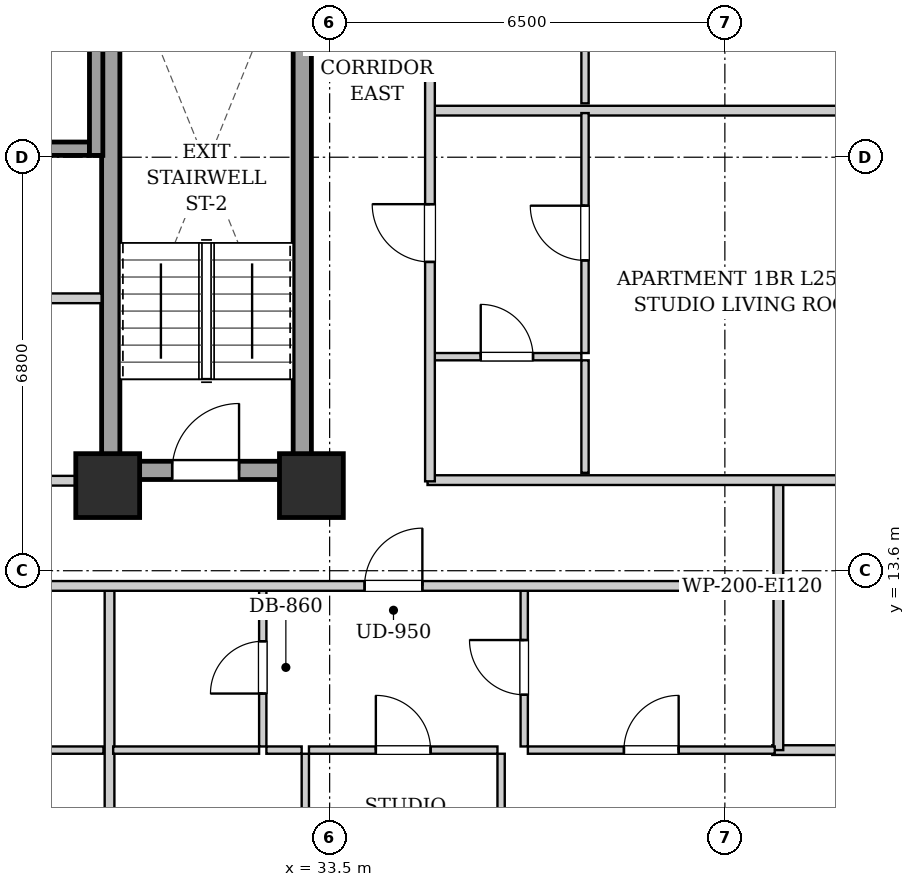
"""IFC4 building model, lengths in metres.
Left out: names, types, materials, properties, quantities, classifications, styles, units other than length and angle.
Written with IfcOpenShell. Run it as: python <this file> out.ifc"""

import sys

from ifc_helpers import new_model, si_unit, direction, frame, frame_2d, origin, origin_2d, place, context, subcontext, project, spatial, rectangle, extrude, element, fill, save


model = new_model("IFC4")
c1 = context("Model", 3, precision=1e-05, world=origin(), true_north=direction((0.0, 1.0)))
c2 = subcontext(c1, "Body", "Model", "MODEL_VIEW")
j1 = project(units=[si_unit("LENGTHUNIT", "METRE"), si_unit("PLANEANGLEUNIT", "RADIAN")], contexts=[c1])
p1 = place(None, origin())
s1 = spatial("IfcSite", under=j1, at=p1, CompositionType="ELEMENT")
p2 = place(p1, origin())
s2 = spatial("IfcBuilding", under=s1, at=p2, CompositionType="ELEMENT")
p3 = place(p2, frame((0.0, 0.0, 91.1)))
s3 = spatial("IfcBuildingStorey", under=s2, at=p3, CompositionType="ELEMENT", Elevation=91.1)
for number, where, z_axis, x_axis in (
    (1, (29.85, 15.0, 0.0), (0.0, 0.0, 1.0), (1.0, 0.0, 0.0)),
    (2, (33.2, 15.0, 0.0), (0.0, 0.0, 1.0), (1.0, 0.0, 0.0)),
):
    element("IfcColumn", number, at=place(p3, frame(where, z_axis=z_axis, x_axis=x_axis)), inside=s3, PredefinedType="COLUMN", context=c2, shape_type="SweptSolid", body=[
        extrude(rectangle(XDim=1.05, YDim=1.05, at=origin_2d()), origin(), (0.0, 0.0, 1.0), 3.2),
    ])
for number, where, z_axis, x_axis in (
    (3, (29.9, 15.1, 0.0), (0.0, 0.0, 1.0), (0.0, 1.0, 0.0)),
    (4, (33.05, 15.1, 0.0), (0.0, 0.0, 1.0), (0.0, 1.0, 0.0)),
):
    element("IfcWall", number, at=place(p3, frame(where, z_axis=z_axis, x_axis=x_axis)), inside=s3, PredefinedType="SHEAR", context=c2, shape_type="SweptSolid", body=[
        extrude(rectangle(XDim=9.0, YDim=0.3, at=frame_2d((4.5, 0.0))), origin(), (0.0, 0.0, 1.0), 2.94),
    ])
p4 = place(p3, frame((30.05, 15.25, 0.0), z_axis=(0.0, 0.0, 1.0), x_axis=(1.0, 0.0, 0.0)))
e5 = element("IfcWall", 5, at=p4, inside=s3, PredefinedType="SHEAR", context=c2, shape_type="SweptSolid", body=[
    extrude(rectangle(XDim=2.85, YDim=0.3, at=frame_2d((1.425, 0.0))), origin(), (0.0, 0.0, 1.0), 2.94),
])
p5 = place(p4, frame((0.86, 0.0, 0.0)))
e6 = element("IfcOpeningElement", 6, at=p5, cuts=e5, PredefinedType="OPENING", context=c2, shape_type="SweptSolid", body=[
    extrude(rectangle(XDim=1.1, YDim=2.05, at=frame_2d((0.55, 1.025))), frame((0.0, 0.16, 0.0), z_axis=(0.0, -1.0, 0.0), x_axis=(1.0, 0.0, 0.0)), (0.0, 0.0, 1.0), 0.32),
])
p6 = place(p3, frame((27.65, 20.54, 0.0), z_axis=(0.0, 0.0, 1.0), x_axis=(1.0, 0.0, 0.0)))
e7 = element("IfcWall", 7, at=p6, inside=s3, PredefinedType="SHEAR", context=c2, shape_type="SweptSolid", body=[
    extrude(rectangle(XDim=1.9, YDim=0.22, at=frame_2d((0.95, 0.0))), origin(), (0.0, 0.0, 1.0), 2.94),
])
p7 = place(p3, frame((29.66, 20.43, 0.0), z_axis=(0.0, 0.0, 1.0), x_axis=(0.0, 1.0, 0.0)))
e8 = element("IfcWall", 8, at=p7, inside=s3, PredefinedType="SHEAR", context=c2, shape_type="SweptSolid", body=[
    extrude(rectangle(XDim=2.44, YDim=0.22, at=frame_2d((1.22, 0.0))), origin(), (0.0, 0.0, 1.0), 2.94),
])
p8 = place(p3, frame((21.25, 15.08, 0.0), z_axis=(0.0, 0.0, 1.0), x_axis=(1.0, 0.0, 0.0)))
e9 = element("IfcWall", 9, at=p8, inside=s3, PredefinedType="PARTITIONING", context=c2, shape_type="SweptSolid", body=[
    extrude(rectangle(XDim=8.5, YDim=0.16, at=frame_2d((4.25, 0.0))), origin(), (0.0, 0.0, 1.0), 2.309),
])
p9 = place(p8, frame((3.725, 0.0, 0.0)))
e10 = element("IfcOpeningElement", 10, at=p9, cuts=e9, PredefinedType="OPENING", context=c2, shape_type="SweptSolid", body=[
    extrude(rectangle(XDim=1.05, YDim=2.05, at=frame_2d((0.525, 1.025))), frame((0.0, 0.09, 0.0), z_axis=(0.0, -1.0, 0.0), x_axis=(1.0, 0.0, 0.0)), (0.0, 0.0, 1.0), 0.18),
])
p10 = place(p3, frame((28.65, 18.08, 0.0), z_axis=(0.0, 0.0, 1.0), x_axis=(1.0, 0.0, 0.0)))
e11 = element("IfcWall", 11, at=p10, inside=s3, PredefinedType="PARTITIONING", context=c2, shape_type="SweptSolid", body=[
    extrude(rectangle(XDim=1.1, YDim=0.16, at=frame_2d((0.55, 0.0))), origin(), (0.0, 0.0, 1.0), 2.94),
])
p11 = place(p3, frame((40.88, 13.35, 0.0), z_axis=(0.0, 0.0, 1.0), x_axis=(0.0, 1.0, 0.0)))
e12 = element("IfcWall", 12, at=p11, inside=s3, PredefinedType="PARTITIONING", context=c2, shape_type="SweptSolid", body=[
    extrude(rectangle(XDim=1.74, YDim=0.16, at=frame_2d((0.87, 0.0))), origin(), (0.0, 0.0, 1.0), 2.94),
])
p12 = place(p3, frame((35.11, 15.09, 0.0), z_axis=(0.0, 0.0, 1.0), x_axis=(1.0, 0.0, 0.0)))
e13 = element("IfcWall", 13, at=p12, inside=s3, PredefinedType="PARTITIONING", context=c2, shape_type="SweptSolid", body=[
    extrude(rectangle(XDim=8.01, YDim=0.16, at=frame_2d((4.005, 0.0))), origin(), (0.0, 0.0, 1.0), 2.309),
])
p13 = place(p3, frame((25.382, 10.65, 0.0), z_axis=(0.0, 0.0, 1.0), x_axis=(1.0, 0.0, 0.0)))
e14 = element("IfcWall", 14, at=p13, inside=s3, PredefinedType="PARTITIONING", context=c2, shape_type="SweptSolid", body=[
    extrude(rectangle(XDim=4.398, YDim=0.12, at=frame_2d((2.199, 0.0))), origin(), (0.0, 0.0, 1.0), 2.94),
])
p14 = place(p13, frame((1.749, 0.0, 0.0)))
e15 = element("IfcOpeningElement", 15, at=p14, cuts=e14, PredefinedType="OPENING", context=c2, shape_type="SweptSolid", body=[
    extrude(rectangle(XDim=0.9, YDim=2.05, at=frame_2d((0.45, 1.025))), frame((0.0, 0.07, 0.0), z_axis=(0.0, -1.0, 0.0), x_axis=(1.0, 0.0, 0.0)), (0.0, 0.0, 1.0), 0.14),
])
p15 = place(p3, frame((40.78, 10.65, 0.0), z_axis=(0.0, 0.0, 1.0), x_axis=(1.0, 0.0, 0.0)))
e16 = element("IfcWall", 16, at=p15, inside=s3, PredefinedType="PARTITIONING", context=c2, shape_type="SweptSolid", body=[
    extrude(rectangle(XDim=2.34, YDim=0.16, at=frame_2d((1.17, 0.0))), origin(), (0.0, 0.0, 1.0), 2.94),
])
p16 = place(p3, frame((40.88, 10.65, 0.0), z_axis=(0.0, 0.0, 1.0), x_axis=(0.0, 1.0, 0.0)))
e17 = element("IfcWall", 17, at=p16, inside=s3, PredefinedType="PARTITIONING", context=c2, shape_type="SweptSolid", body=[
    extrude(rectangle(XDim=2.66, YDim=0.16, at=frame_2d((1.33, 0.0))), origin(), (0.0, 0.0, 1.0), 2.94),
])
p17 = place(p3, frame((29.88, 0.28, 0.0), z_axis=(0.0, 0.0, 1.0), x_axis=(0.0, 1.0, 0.0)))
e18 = element("IfcWall", 18, at=p17, inside=s3, PredefinedType="PARTITIONING", context=c2, shape_type="SweptSolid", body=[
    extrude(rectangle(XDim=13.03, YDim=0.16, at=frame_2d((6.515, 0.0))), origin(), (0.0, 0.0, 1.0), 2.94),
])
p18 = place(p3, frame((32.4, 10.71, 0.0), z_axis=(0.0, 0.0, 1.0), x_axis=(0.0, 1.0, 0.0)))
e19 = element("IfcWall", 19, at=p18, inside=s3, PredefinedType="PARTITIONING", context=c2, shape_type="SweptSolid", body=[
    extrude(rectangle(XDim=2.6, YDim=0.12, at=frame_2d((1.3, 0.0))), origin(), (0.0, 0.0, 1.0), 2.94),
])
p19 = place(p18, frame((0.87, 0.0, 0.0)))
e20 = element("IfcOpeningElement", 20, at=p19, cuts=e19, PredefinedType="OPENING", context=c2, shape_type="SweptSolid", body=[
    extrude(rectangle(XDim=0.86, YDim=2.05, at=frame_2d((0.43, 1.025))), frame((0.0, 0.07, 0.0), z_axis=(0.0, -1.0, 0.0), x_axis=(1.0, 0.0, 0.0)), (0.0, 0.0, 1.0), 0.14),
])
p20 = place(p3, frame((29.94, 10.65, 0.0), z_axis=(0.0, 0.0, 1.0), x_axis=(1.0, 0.0, 0.0)))
e21 = element("IfcWall", 21, at=p20, inside=s3, PredefinedType="PARTITIONING", context=c2, shape_type="SweptSolid", body=[
    extrude(rectangle(XDim=2.4, YDim=0.12, at=frame_2d((1.2, 0.0))), origin(), (0.0, 0.0, 1.0), 2.94),
])
p21 = place(p3, frame((36.7, 10.71, 0.0), z_axis=(0.0, 0.0, 1.0), x_axis=(0.0, 1.0, 0.0)))
e22 = element("IfcWall", 22, at=p21, inside=s3, PredefinedType="PARTITIONING", context=c2, shape_type="SweptSolid", body=[
    extrude(rectangle(XDim=2.6, YDim=0.12, at=frame_2d((1.3, 0.0))), origin(), (0.0, 0.0, 1.0), 2.94),
])
p22 = place(p21, frame((0.85, 0.0, 0.0)))
e23 = element("IfcOpeningElement", 23, at=p22, cuts=e22, PredefinedType="OPENING", context=c2, shape_type="SweptSolid", body=[
    extrude(rectangle(XDim=0.9, YDim=2.05, at=frame_2d((0.45, 1.025))), frame((0.0, 0.07, 0.0), z_axis=(0.0, -1.0, 0.0), x_axis=(1.0, 0.0, 0.0)), (0.0, 0.0, 1.0), 0.14),
])
p23 = place(p3, frame((32.46, 10.65, 0.0), z_axis=(0.0, 0.0, 1.0), x_axis=(1.0, 0.0, 0.0)))
e24 = element("IfcWall", 24, at=p23, inside=s3, PredefinedType="PARTITIONING", context=c2, shape_type="SweptSolid", body=[
    extrude(rectangle(XDim=0.58, YDim=0.12, at=frame_2d((0.29, 0.0))), origin(), (0.0, 0.0, 1.0), 2.94),
])
p24 = place(p3, frame((33.16, 10.65, 0.0), z_axis=(0.0, 0.0, 1.0), x_axis=(1.0, 0.0, 0.0)))
e25 = element("IfcWall", 25, at=p24, inside=s3, PredefinedType="PARTITIONING", context=c2, shape_type="SweptSolid", body=[
    extrude(rectangle(XDim=3.1, YDim=0.12, at=frame_2d((1.55, 0.0))), origin(), (0.0, 0.0, 1.0), 2.94),
])
p25 = place(p24, frame((1.1, 0.0, 0.0)))
e26 = element("IfcOpeningElement", 26, at=p25, cuts=e25, PredefinedType="OPENING", context=c2, shape_type="SweptSolid", body=[
    extrude(rectangle(XDim=0.9, YDim=2.05, at=frame_2d((0.45, 1.025))), frame((0.0, 0.07, 0.0), z_axis=(0.0, -1.0, 0.0), x_axis=(1.0, 0.0, 0.0)), (0.0, 0.0, 1.0), 0.14),
])
p26 = place(p3, frame((36.76, 10.65, 0.0), z_axis=(0.0, 0.0, 1.0), x_axis=(1.0, 0.0, 0.0)))
e27 = element("IfcWall", 27, at=p26, inside=s3, PredefinedType="PARTITIONING", context=c2, shape_type="SweptSolid", body=[
    extrude(rectangle(XDim=4.06, YDim=0.12, at=frame_2d((2.03, 0.0))), origin(), (0.0, 0.0, 1.0), 2.94),
])
p27 = place(p26, frame((1.58, 0.0, 0.0)))
e28 = element("IfcOpeningElement", 28, at=p27, cuts=e27, PredefinedType="OPENING", context=c2, shape_type="SweptSolid", body=[
    extrude(rectangle(XDim=0.9, YDim=2.05, at=frame_2d((0.45, 1.025))), frame((0.0, 0.07, 0.0), z_axis=(0.0, -1.0, 0.0), x_axis=(1.0, 0.0, 0.0)), (0.0, 0.0, 1.0), 0.14),
])
p28 = place(p3, frame((33.1, 0.28, 0.0), z_axis=(0.0, 0.0, 1.0), x_axis=(0.0, 1.0, 0.0)))
e29 = element("IfcWall", 29, at=p28, inside=s3, PredefinedType="PARTITIONING", context=c2, shape_type="SweptSolid", body=[
    extrude(rectangle(XDim=10.31, YDim=0.12, at=frame_2d((5.155, 0.0))), origin(), (0.0, 0.0, 1.0), 2.309),
])
p29 = place(p28, frame((4.69, 0.0, 0.0)))
e30 = element("IfcOpeningElement", 30, at=p29, cuts=e29, PredefinedType="OPENING", context=c2, shape_type="SweptSolid", body=[
    extrude(rectangle(XDim=0.9, YDim=2.05, at=frame_2d((0.45, 1.025))), frame((0.0, 0.07, 0.0), z_axis=(0.0, -1.0, 0.0), x_axis=(1.0, 0.0, 0.0)), (0.0, 0.0, 1.0), 0.14),
])
p30 = place(p3, frame((36.32, 0.28, 0.0), z_axis=(0.0, 0.0, 1.0), x_axis=(0.0, 1.0, 0.0)))
e31 = element("IfcWall", 31, at=p30, inside=s3, PredefinedType="PARTITIONING", context=c2, shape_type="SweptSolid", body=[
    extrude(rectangle(XDim=10.31, YDim=0.12, at=frame_2d((5.155, 0.0))), origin(), (0.0, 0.0, 1.0), 2.94),
])
p31 = place(p30, frame((4.69, 0.0, 0.0)))
e32 = element("IfcOpeningElement", 32, at=p31, cuts=e31, PredefinedType="OPENING", context=c2, shape_type="SweptSolid", body=[
    extrude(rectangle(XDim=0.9, YDim=2.05, at=frame_2d((0.45, 1.025))), frame((0.0, 0.07, 0.0), z_axis=(0.0, -1.0, 0.0), x_axis=(1.0, 0.0, 0.0)), (0.0, 0.0, 1.0), 0.14),
])
p32 = place(p3, frame((35.19, 21.166, 0.0), z_axis=(0.0, 0.0, 1.0), x_axis=(1.0, 0.0, 0.0)))
e33 = element("IfcWall", 33, at=p32, inside=s3, PredefinedType="PARTITIONING", context=c2, shape_type="SweptSolid", body=[
    extrude(rectangle(XDim=7.93, YDim=0.16, at=frame_2d((3.965, 0.0))), origin(), (0.0, 0.0, 1.0), 2.94),
])
p33 = place(p3, frame((35.19, 17.12, 0.0), z_axis=(0.0, 0.0, 1.0), x_axis=(1.0, 0.0, 0.0)))
e34 = element("IfcWall", 34, at=p33, inside=s3, PredefinedType="PARTITIONING", context=c2, shape_type="SweptSolid", body=[
    extrude(rectangle(XDim=2.45, YDim=0.12, at=frame_2d((1.225, 0.0))), origin(), (0.0, 0.0, 1.0), 2.94),
])
p34 = place(p33, frame((0.795, 0.0, 0.0)))
e35 = element("IfcOpeningElement", 35, at=p34, cuts=e34, PredefinedType="OPENING", context=c2, shape_type="SweptSolid", body=[
    extrude(rectangle(XDim=0.86, YDim=2.05, at=frame_2d((0.43, 1.025))), frame((0.0, 0.07, 0.0), z_axis=(0.0, -1.0, 0.0), x_axis=(1.0, 0.0, 0.0)), (0.0, 0.0, 1.0), 0.14),
])
p35 = place(p3, frame((37.7, 15.21, 0.0), z_axis=(0.0, 0.0, 1.0), x_axis=(0.0, 1.0, 0.0)))
e36 = element("IfcWall", 36, at=p35, inside=s3, PredefinedType="PARTITIONING", context=c2, shape_type="SweptSolid", body=[
    extrude(rectangle(XDim=1.85, YDim=0.12, at=frame_2d((0.925, 0.0))), origin(), (0.0, 0.0, 1.0), 2.94),
])
p36 = place(p3, frame((37.7, 17.18, 0.0), z_axis=(0.0, 0.0, 1.0), x_axis=(0.0, 1.0, 0.0)))
e37 = element("IfcWall", 37, at=p36, inside=s3, PredefinedType="PARTITIONING", context=c2, shape_type="SweptSolid", body=[
    extrude(rectangle(XDim=3.946, YDim=0.12, at=frame_2d((1.973, 0.0))), origin(), (0.0, 0.0, 1.0), 2.94),
])
p37 = place(p36, frame((1.523, 0.0, 0.0)))
e38 = element("IfcOpeningElement", 38, at=p37, cuts=e37, PredefinedType="OPENING", context=c2, shape_type="SweptSolid", body=[
    extrude(rectangle(XDim=0.9, YDim=2.05, at=frame_2d((0.45, 1.025))), frame((0.0, 0.07, 0.0), z_axis=(0.0, -1.0, 0.0), x_axis=(1.0, 0.0, 0.0)), (0.0, 0.0, 1.0), 0.14),
])
p38 = place(p3, frame((37.7, 21.286, 0.0), z_axis=(0.0, 0.0, 1.0), x_axis=(0.0, 1.0, 0.0)))
e39 = element("IfcWall", 39, at=p38, inside=s3, PredefinedType="PARTITIONING", context=c2, shape_type="SweptSolid", body=[
    extrude(rectangle(XDim=2.121, YDim=0.12, at=frame_2d((1.061, 0.0))), origin(), (0.0, 0.0, 1.0), 2.94),
])
p39 = place(p3, frame((10.05, 13.35, 0.0), z_axis=(0.0, 0.0, 1.0), x_axis=(1.0, 0.0, 0.0)))
e40 = element("IfcWall", 40, at=p39, inside=s3, PredefinedType="PARTITIONING", context=c2, shape_type="SweptSolid", body=[
    extrude(rectangle(XDim=30.8, YDim=0.16, at=frame_2d((15.4, 0.0))), origin(), (0.0, 0.0, 1.0), 2.94),
])
p40 = place(p39, frame((0.62, 0.0, 0.0)))
e41 = element("IfcOpeningElement", 41, at=p40, cuts=e40, PredefinedType="OPENING", context=c2, shape_type="SweptSolid", body=[
    extrude(rectangle(XDim=0.95, YDim=2.1, at=frame_2d((0.475, 1.05))), frame((0.0, 0.09, 0.0), z_axis=(0.0, -1.0, 0.0), x_axis=(1.0, 0.0, 0.0)), (0.0, 0.0, 1.0), 0.18),
])
p41 = place(p39, frame((6.115, 0.0, 0.0)))
e42 = element("IfcOpeningElement", 42, at=p41, cuts=e40, PredefinedType="OPENING", context=c2, shape_type="SweptSolid", body=[
    extrude(rectangle(XDim=0.95, YDim=2.1, at=frame_2d((0.475, 1.05))), frame((0.0, 0.09, 0.0), z_axis=(0.0, -1.0, 0.0), x_axis=(1.0, 0.0, 0.0)), (0.0, 0.0, 1.0), 0.18),
])
p42 = place(p39, frame((17.056, 0.0, 0.0)))
e43 = element("IfcOpeningElement", 43, at=p42, cuts=e40, PredefinedType="OPENING", context=c2, shape_type="SweptSolid", body=[
    extrude(rectangle(XDim=0.95, YDim=2.1, at=frame_2d((0.475, 1.05))), frame((0.0, 0.09, 0.0), z_axis=(0.0, -1.0, 0.0), x_axis=(1.0, 0.0, 0.0)), (0.0, 0.0, 1.0), 0.18),
])
p43 = place(p39, frame((24.025, 0.0, 0.0)))
e44 = element("IfcOpeningElement", 44, at=p43, cuts=e40, PredefinedType="OPENING", context=c2, shape_type="SweptSolid", body=[
    extrude(rectangle(XDim=0.95, YDim=2.1, at=frame_2d((0.475, 1.05))), frame((0.0, 0.09, 0.0), z_axis=(0.0, -1.0, 0.0), x_axis=(1.0, 0.0, 0.0)), (0.0, 0.0, 1.0), 0.18),
])
p44 = place(p3, frame((35.15, 15.07, 0.0), z_axis=(0.0, 0.0, 1.0), x_axis=(0.0, 1.0, 0.0)))
e45 = element("IfcWall", 45, at=p44, inside=s3, PredefinedType="PARTITIONING", context=c2, shape_type="SweptSolid", body=[
    extrude(rectangle(XDim=13.93, YDim=0.16, at=frame_2d((6.965, 0.0))), origin(), (0.0, 0.0, 1.0), 2.94),
])
p45 = place(p44, frame((3.608, 0.0, 0.0)))
e46 = element("IfcOpeningElement", 46, at=p45, cuts=e45, PredefinedType="OPENING", context=c2, shape_type="SweptSolid", body=[
    extrude(rectangle(XDim=0.95, YDim=2.1, at=frame_2d((0.475, 1.05))), frame((0.0, 0.09, 0.0), z_axis=(0.0, -1.0, 0.0), x_axis=(1.0, 0.0, 0.0)), (0.0, 0.0, 1.0), 0.18),
])
p46 = place(p44, frame((10.649, 0.0, 0.0)))
e47 = element("IfcOpeningElement", 47, at=p46, cuts=e45, PredefinedType="OPENING", context=c2, shape_type="SweptSolid", body=[
    extrude(rectangle(XDim=0.95, YDim=2.1, at=frame_2d((0.475, 1.05))), frame((0.0, 0.09, 0.0), z_axis=(0.0, -1.0, 0.0), x_axis=(1.0, 0.0, 0.0)), (0.0, 0.0, 1.0), 0.18),
])
p47 = place(p5, origin())
e48 = element("IfcDoor", 48, at=p47, inside=s3, OperationType="SINGLE_SWING_RIGHT", PredefinedType="DOOR", context=c2, shape_type="SweptSolid", body=[
    extrude(rectangle(XDim=1.1, YDim=2.05, at=frame_2d((0.55, 1.025))), frame((0.0, 0.025, 0.0), z_axis=(0.0, -1.0, 0.0), x_axis=(1.0, 0.0, 0.0)), (0.0, 0.0, 1.0), 0.05),
])
fill(e6, e48)
p48 = place(p19, origin())
e49 = element("IfcDoor", 49, at=p48, inside=s3, OperationType="SINGLE_SWING_LEFT", PredefinedType="DOOR", context=c2, shape_type="SweptSolid", body=[
    extrude(rectangle(XDim=0.86, YDim=2.05, at=frame_2d((0.43, 1.025))), frame((0.0, 0.025, 0.0), z_axis=(0.0, -1.0, 0.0), x_axis=(1.0, 0.0, 0.0)), (0.0, 0.0, 1.0), 0.05),
])
fill(e20, e49)
p49 = place(p22, origin())
e50 = element("IfcDoor", 50, at=p49, inside=s3, OperationType="SINGLE_SWING_RIGHT", PredefinedType="DOOR", context=c2, shape_type="SweptSolid", body=[
    extrude(rectangle(XDim=0.9, YDim=2.05, at=frame_2d((0.45, 1.025))), frame((0.0, 0.025, 0.0), z_axis=(0.0, -1.0, 0.0), x_axis=(1.0, 0.0, 0.0)), (0.0, 0.0, 1.0), 0.05),
])
fill(e23, e50)
p50 = place(p25, origin())
e51 = element("IfcDoor", 51, at=p50, inside=s3, OperationType="SINGLE_SWING_LEFT", PredefinedType="DOOR", context=c2, shape_type="SweptSolid", body=[
    extrude(rectangle(XDim=0.9, YDim=2.05, at=frame_2d((0.45, 1.025))), frame((0.0, 0.025, 0.0), z_axis=(0.0, -1.0, 0.0), x_axis=(1.0, 0.0, 0.0)), (0.0, 0.0, 1.0), 0.05),
])
fill(e26, e51)
p51 = place(p27, origin())
e52 = element("IfcDoor", 52, at=p51, inside=s3, OperationType="SINGLE_SWING_RIGHT", PredefinedType="DOOR", context=c2, shape_type="SweptSolid", body=[
    extrude(rectangle(XDim=0.9, YDim=2.05, at=frame_2d((0.45, 1.025))), frame((0.0, 0.025, 0.0), z_axis=(0.0, -1.0, 0.0), x_axis=(1.0, 0.0, 0.0)), (0.0, 0.0, 1.0), 0.05),
])
fill(e28, e52)
p52 = place(p34, origin())
e53 = element("IfcDoor", 53, at=p52, inside=s3, OperationType="SINGLE_SWING_LEFT", PredefinedType="DOOR", context=c2, shape_type="SweptSolid", body=[
    extrude(rectangle(XDim=0.86, YDim=2.05, at=frame_2d((0.43, 1.025))), frame((0.0, 0.025, 0.0), z_axis=(0.0, -1.0, 0.0), x_axis=(1.0, 0.0, 0.0)), (0.0, 0.0, 1.0), 0.05),
])
fill(e35, e53)
p53 = place(p37, origin())
e54 = element("IfcDoor", 54, at=p53, inside=s3, OperationType="SINGLE_SWING_RIGHT", PredefinedType="DOOR", context=c2, shape_type="SweptSolid", body=[
    extrude(rectangle(XDim=0.9, YDim=2.05, at=frame_2d((0.45, 1.025))), frame((0.0, 0.025, 0.0), z_axis=(0.0, -1.0, 0.0), x_axis=(1.0, 0.0, 0.0)), (0.0, 0.0, 1.0), 0.05),
])
fill(e38, e54)
p54 = place(p43, origin())
e55 = element("IfcDoor", 55, at=p54, inside=s3, OperationType="SINGLE_SWING_RIGHT", PredefinedType="DOOR", context=c2, shape_type="SweptSolid", body=[
    extrude(rectangle(XDim=0.95, YDim=2.1, at=frame_2d((0.475, 1.05))), frame((0.0, 0.025, 0.0), z_axis=(0.0, -1.0, 0.0), x_axis=(1.0, 0.0, 0.0)), (0.0, 0.0, 1.0), 0.05),
])
fill(e44, e55)
p55 = place(p45, origin())
e56 = element("IfcDoor", 56, at=p55, inside=s3, OperationType="SINGLE_SWING_RIGHT", PredefinedType="DOOR", context=c2, shape_type="SweptSolid", body=[
    extrude(rectangle(XDim=0.95, YDim=2.1, at=frame_2d((0.475, 1.05))), frame((0.0, 0.025, 0.0), z_axis=(0.0, -1.0, 0.0), x_axis=(1.0, 0.0, 0.0)), (0.0, 0.0, 1.0), 0.05),
])
fill(e46, e56)
save(model, sys.argv[1])
